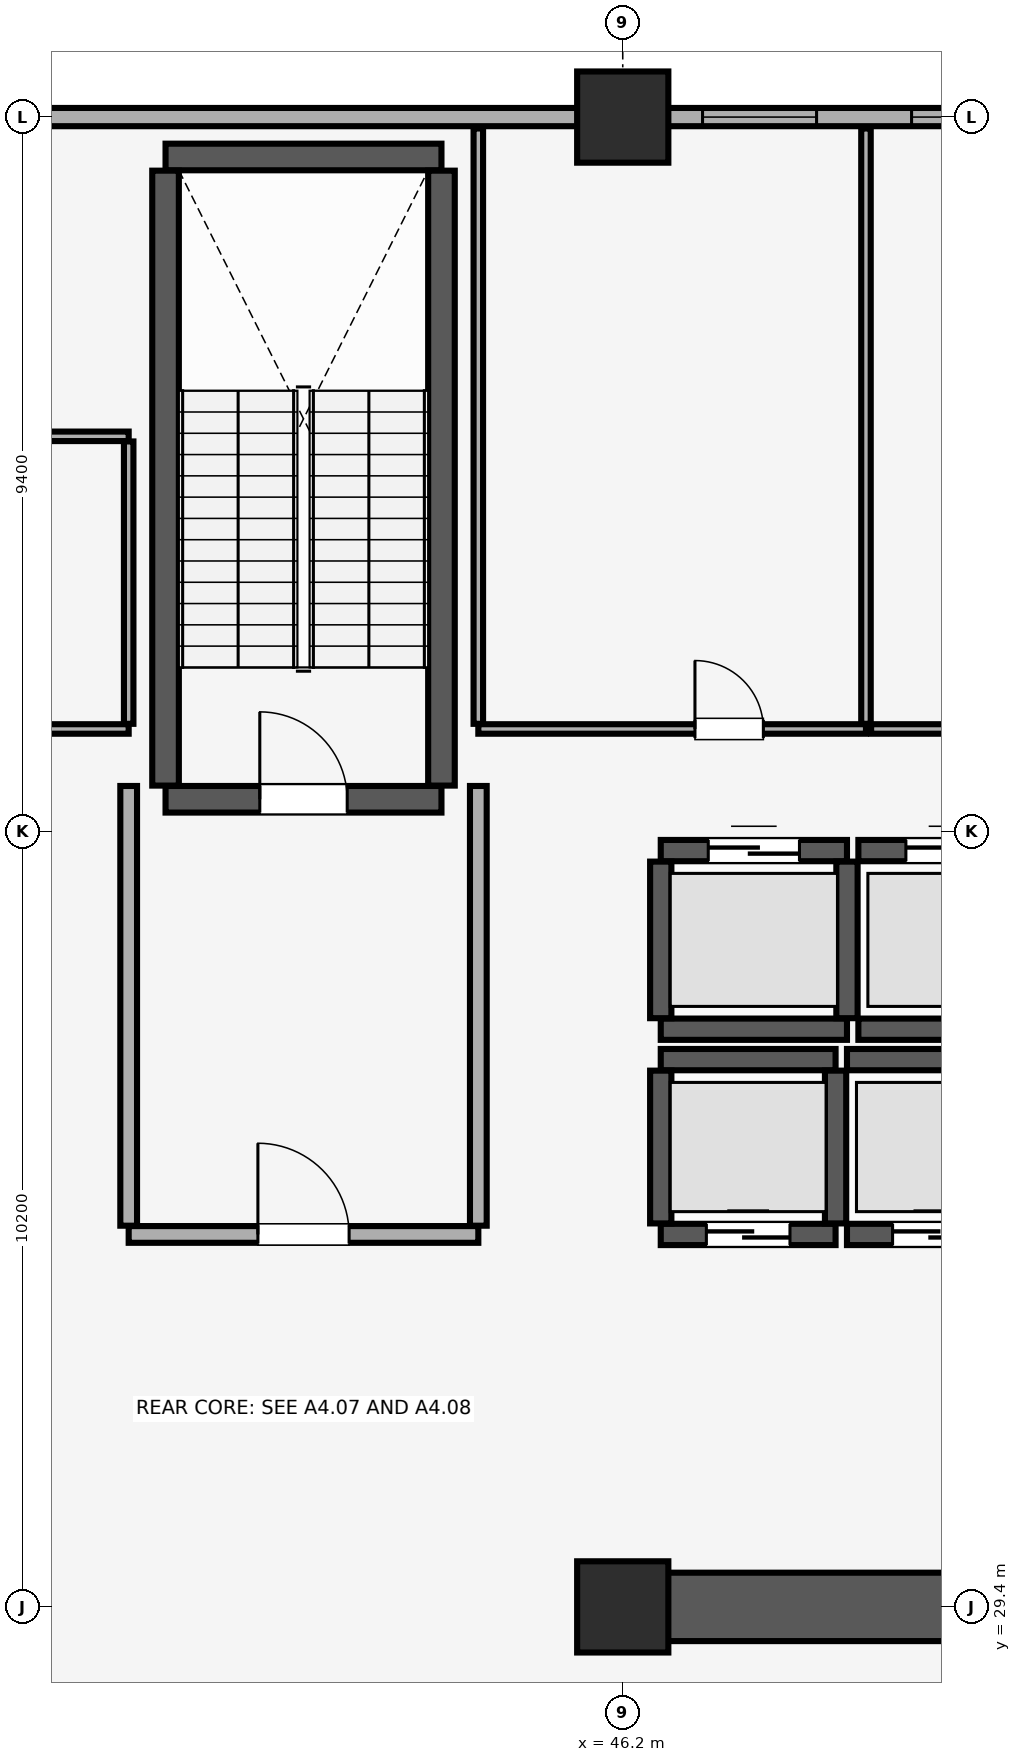
"""IFC4 building model, lengths in metres.
Left out: names, types, materials, properties, quantities, classifications, styles, units other than length and angle.
Written with IfcOpenShell. Run it as: python <this file> out.ifc"""

import sys

from ifc_helpers import new_model, si_unit, direction, frame, frame_2d, origin, origin_2d, place, context, subcontext, project, spatial, rectangle, extrude, element, fill, save


model = new_model("IFC4")
c1 = context("Model", 3, precision=1e-05, world=origin(), true_north=direction((0.0, 1.0)))
c2 = subcontext(c1, "Body", "Model", "MODEL_VIEW")
j1 = project(units=[si_unit("LENGTHUNIT", "METRE"), si_unit("PLANEANGLEUNIT", "RADIAN")], contexts=[c1])
p1 = place(None, origin())
s1 = spatial("IfcSite", under=j1, at=p1, CompositionType="ELEMENT")
p2 = place(p1, origin())
s2 = spatial("IfcBuilding", under=s1, at=p2, CompositionType="ELEMENT")
p3 = place(p2, frame((0.0, 0.0, 224.35)))
s3 = spatial("IfcBuildingStorey", under=s2, at=p3, CompositionType="ELEMENT", Elevation=224.35)
for number, where, z_axis, x_axis in (
    (1, (46.2, 29.4, 0.0), (0.0, 0.0, 1.0), (1.0, 0.0, 0.0)),
    (2, (46.2, 49.0, 0.0), (0.0, 0.0, 1.0), (1.0, 0.0, 0.0)),
):
    element("IfcColumn", number, at=place(p3, frame(where, z_axis=z_axis, x_axis=x_axis)), inside=s3, PredefinedType="COLUMN", context=c2, shape_type="SweptSolid", body=[
        extrude(rectangle(XDim=1.2, YDim=1.2, at=origin_2d()), origin(), (0.0, 0.0, 1.0), 4.56),
    ])
p4 = place(p3, frame((77.0, 49.0, 0.0), z_axis=(0.0, 0.0, 1.0), x_axis=(-1.0, 0.0, 0.0)))
e3 = element("IfcWall", 3, at=p4, inside=s3, PredefinedType="SOLIDWALL", context=c2, shape_type="SweptSolid", body=[
    extrude(rectangle(XDim=70.0, YDim=0.24, at=frame_2d((35.0, 0.0))), origin(), (0.0, 0.0, 1.0), 3.4),
])
p5 = place(p4, frame((62.975, 0.0, 0.85)))
e4 = element("IfcOpeningElement", 4, at=p5, cuts=e3, PredefinedType="OPENING", context=c2, shape_type="SweptSolid", body=[
    extrude(rectangle(XDim=3.0, YDim=1.5, at=frame_2d((1.5, 0.75))), frame((0.0, 0.13, 0.0), z_axis=(0.0, -1.0, 0.0), x_axis=(1.0, 0.0, 0.0)), (0.0, 0.0, 1.0), 0.26),
])
p6 = place(p4, frame((4.025, 0.0, 0.85)))
e5 = element("IfcOpeningElement", 5, at=p6, cuts=e3, PredefinedType="OPENING", context=c2, shape_type="SweptSolid", body=[
    extrude(rectangle(XDim=3.0, YDim=1.5, at=frame_2d((1.5, 0.75))), frame((0.0, 0.13, 0.0), z_axis=(0.0, -1.0, 0.0), x_axis=(1.0, 0.0, 0.0)), (0.0, 0.0, 1.0), 0.26),
])
p7 = place(p4, frame((49.465, 0.0, 0.9)))
e6 = element("IfcOpeningElement", 6, at=p7, cuts=e3, PredefinedType="OPENING", context=c2, shape_type="SweptSolid", body=[
    extrude(rectangle(XDim=1.5, YDim=1.4, at=frame_2d((0.75, 0.7))), frame((0.0, 0.13, 0.0), z_axis=(0.0, -1.0, 0.0), x_axis=(1.0, 0.0, 0.0)), (0.0, 0.0, 1.0), 0.26),
])
p8 = place(p4, frame((41.65, 0.0, 0.9)))
e7 = element("IfcOpeningElement", 7, at=p8, cuts=e3, PredefinedType="OPENING", context=c2, shape_type="SweptSolid", body=[
    extrude(rectangle(XDim=3.6, YDim=1.5, at=frame_2d((1.8, 0.75))), frame((0.0, 0.13, 0.0), z_axis=(0.0, -1.0, 0.0), x_axis=(1.0, 0.0, 0.0)), (0.0, 0.0, 1.0), 0.26),
])
p9 = place(p4, frame((28.25, 0.0, 0.9)))
e8 = element("IfcOpeningElement", 8, at=p9, cuts=e3, PredefinedType="OPENING", context=c2, shape_type="SweptSolid", body=[
    extrude(rectangle(XDim=1.5, YDim=1.4, at=frame_2d((0.75, 0.7))), frame((0.0, 0.13, 0.0), z_axis=(0.0, -1.0, 0.0), x_axis=(1.0, 0.0, 0.0)), (0.0, 0.0, 1.0), 0.26),
])
p10 = place(p4, frame((24.6, 0.0, 0.9)))
e9 = element("IfcOpeningElement", 9, at=p10, cuts=e3, PredefinedType="OPENING", context=c2, shape_type="SweptSolid", body=[
    extrude(rectangle(XDim=2.4, YDim=1.5, at=frame_2d((1.2, 0.75))), frame((0.0, 0.13, 0.0), z_axis=(0.0, -1.0, 0.0), x_axis=(1.0, 0.0, 0.0)), (0.0, 0.0, 1.0), 0.26),
])
p11 = place(p4, frame((20.235, 0.0, 0.9)))
e10 = element("IfcOpeningElement", 10, at=p11, cuts=e3, PredefinedType="OPENING", context=c2, shape_type="SweptSolid", body=[
    extrude(rectangle(XDim=2.4, YDim=1.5, at=frame_2d((1.2, 0.75))), frame((0.0, 0.13, 0.0), z_axis=(0.0, -1.0, 0.0), x_axis=(1.0, 0.0, 0.0)), (0.0, 0.0, 1.0), 0.26),
])
p12 = place(p3, frame((46.0, 29.4, 0.0), z_axis=(0.0, 0.0, 1.0), x_axis=(1.0, 0.0, 0.0)))
e11 = element("IfcWall", 11, at=p12, inside=s3, PredefinedType="SHEAR", context=c2, shape_type="SweptSolid", body=[
    extrude(rectangle(XDim=7.6, YDim=0.9, at=frame_2d((3.8, 0.0))), origin(), (0.0, 0.0, 1.0), 4.52),
])
p13 = place(p3, frame((40.185, 40.025, 0.0), z_axis=(0.0, 0.0, 1.0), x_axis=(1.0, 0.0, 0.0)))
e12 = element("IfcWall", 12, at=p13, inside=s3, PredefinedType="SHEAR", context=c2, shape_type="SweptSolid", body=[
    extrude(rectangle(XDim=3.63, YDim=0.35, at=frame_2d((1.815, 0.0))), origin(), (0.0, 0.0, 1.0), 4.52),
])
p14 = place(p13, frame((1.24, 0.0, 0.0)))
e13 = element("IfcOpeningElement", 13, at=p14, cuts=e12, PredefinedType="OPENING", context=c2, shape_type="SweptSolid", body=[
    extrude(rectangle(XDim=1.15, YDim=2.15, at=frame_2d((0.575, 1.075))), frame((0.0, 0.185, 0.0), z_axis=(0.0, -1.0, 0.0), x_axis=(1.0, 0.0, 0.0)), (0.0, 0.0, 1.0), 0.37),
])
p15 = place(p3, frame((40.185, 48.475, 0.0), z_axis=(0.0, 0.0, 1.0), x_axis=(1.0, 0.0, 0.0)))
e14 = element("IfcWall", 14, at=p15, inside=s3, PredefinedType="SHEAR", context=c2, shape_type="SweptSolid", body=[
    extrude(rectangle(XDim=3.63, YDim=0.35, at=frame_2d((1.815, 0.0))), origin(), (0.0, 0.0, 1.0), 4.52),
])
for number, where, z_axis, x_axis in (
    (15, (40.185, 40.205, 0.0), (0.0, 0.0, 1.0), (0.0, 1.0, 0.0)),
    (16, (43.815, 40.205, 0.0), (0.0, 0.0, 1.0), (0.0, 1.0, 0.0)),
):
    element("IfcWall", number, at=place(p3, frame(where, z_axis=z_axis, x_axis=x_axis)), inside=s3, PredefinedType="SHEAR", context=c2, shape_type="SweptSolid", body=[
        extrude(rectangle(XDim=8.09, YDim=0.35, at=frame_2d((4.045, 0.0))), origin(), (0.0, 0.0, 1.0), 4.52),
    ])
p16 = place(p3, frame((46.7, 34.3, 0.0), z_axis=(0.0, 0.0, 1.0), x_axis=(1.0, 0.0, 0.0)))
e17 = element("IfcWall", 17, at=p16, inside=s3, PredefinedType="SHEAR", context=c2, shape_type="SweptSolid", body=[
    extrude(rectangle(XDim=2.3, YDim=0.28, at=frame_2d((1.15, 0.0))), origin(), (0.0, 0.0, 1.0), 4.52),
])
p17 = place(p16, frame((0.6, 0.0, 0.0)))
e18 = element("IfcOpeningElement", 18, at=p17, cuts=e17, PredefinedType="OPENING", context=c2, shape_type="SweptSolid", body=[
    extrude(rectangle(XDim=1.1, YDim=2.2, at=frame_2d((0.55, 1.1))), frame((0.0, 0.15, 0.0), z_axis=(0.0, -1.0, 0.0), x_axis=(1.0, 0.0, 0.0)), (0.0, 0.0, 1.0), 0.3),
])
p18 = place(p3, frame((46.7, 36.6, 0.0), z_axis=(0.0, 0.0, 1.0), x_axis=(1.0, 0.0, 0.0)))
e19 = element("IfcWall", 19, at=p18, inside=s3, PredefinedType="SHEAR", context=c2, shape_type="SweptSolid", body=[
    extrude(rectangle(XDim=2.3, YDim=0.28, at=frame_2d((1.15, 0.0))), origin(), (0.0, 0.0, 1.0), 4.52),
])
for number, where, z_axis, x_axis in (
    (20, (46.7, 34.445, 0.0), (0.0, 0.0, 1.0), (0.0, 1.0, 0.0)),
    (21, (49.0, 34.445, 0.0), (0.0, 0.0, 1.0), (0.0, 1.0, 0.0)),
):
    element("IfcWall", number, at=place(p3, frame(where, z_axis=z_axis, x_axis=x_axis)), inside=s3, PredefinedType="SHEAR", context=c2, shape_type="SweptSolid", body=[
        extrude(rectangle(XDim=2.01, YDim=0.28, at=frame_2d((1.005, 0.0))), origin(), (0.0, 0.0, 1.0), 4.52),
    ])
p19 = place(p3, frame((49.15, 34.3, 0.0), z_axis=(0.0, 0.0, 1.0), x_axis=(1.0, 0.0, 0.0)))
e22 = element("IfcWall", 22, at=p19, inside=s3, PredefinedType="SHEAR", context=c2, shape_type="SweptSolid", body=[
    extrude(rectangle(XDim=2.3, YDim=0.28, at=frame_2d((1.15, 0.0))), origin(), (0.0, 0.0, 1.0), 4.52),
])
p20 = place(p19, frame((0.6, 0.0, 0.0)))
e23 = element("IfcOpeningElement", 23, at=p20, cuts=e22, PredefinedType="OPENING", context=c2, shape_type="SweptSolid", body=[
    extrude(rectangle(XDim=1.1, YDim=2.2, at=frame_2d((0.55, 1.1))), frame((0.0, 0.15, 0.0), z_axis=(0.0, -1.0, 0.0), x_axis=(1.0, 0.0, 0.0)), (0.0, 0.0, 1.0), 0.3),
])
p21 = place(p3, frame((49.15, 36.6, 0.0), z_axis=(0.0, 0.0, 1.0), x_axis=(1.0, 0.0, 0.0)))
e24 = element("IfcWall", 24, at=p21, inside=s3, PredefinedType="SHEAR", context=c2, shape_type="SweptSolid", body=[
    extrude(rectangle(XDim=2.3, YDim=0.28, at=frame_2d((1.15, 0.0))), origin(), (0.0, 0.0, 1.0), 4.52),
])
p22 = place(p3, frame((46.7, 37.0, 0.0), z_axis=(0.0, 0.0, 1.0), x_axis=(1.0, 0.0, 0.0)))
e25 = element("IfcWall", 25, at=p22, inside=s3, PredefinedType="SHEAR", context=c2, shape_type="SweptSolid", body=[
    extrude(rectangle(XDim=2.45, YDim=0.28, at=frame_2d((1.225, 0.0))), origin(), (0.0, 0.0, 1.0), 4.52),
])
p23 = place(p3, frame((46.7, 39.35, 0.0), z_axis=(0.0, 0.0, 1.0), x_axis=(1.0, 0.0, 0.0)))
e26 = element("IfcWall", 26, at=p23, inside=s3, PredefinedType="SHEAR", context=c2, shape_type="SweptSolid", body=[
    extrude(rectangle(XDim=2.45, YDim=0.28, at=frame_2d((1.225, 0.0))), origin(), (0.0, 0.0, 1.0), 4.52),
])
p24 = place(p23, frame((0.625, 0.0, 0.0)))
e27 = element("IfcOpeningElement", 27, at=p24, cuts=e26, PredefinedType="OPENING", context=c2, shape_type="SweptSolid", body=[
    extrude(rectangle(XDim=1.2, YDim=2.25, at=frame_2d((0.6, 1.125))), frame((0.0, 0.15, 0.0), z_axis=(0.0, -1.0, 0.0), x_axis=(1.0, 0.0, 0.0)), (0.0, 0.0, 1.0), 0.3),
])
for number, where, z_axis, x_axis in (
    (28, (46.7, 37.145, 0.0), (0.0, 0.0, 1.0), (0.0, 1.0, 0.0)),
    (29, (49.15, 37.145, 0.0), (0.0, 0.0, 1.0), (0.0, 1.0, 0.0)),
):
    element("IfcWall", number, at=place(p3, frame(where, z_axis=z_axis, x_axis=x_axis)), inside=s3, PredefinedType="SHEAR", context=c2, shape_type="SweptSolid", body=[
        extrude(rectangle(XDim=2.06, YDim=0.28, at=frame_2d((1.03, 0.0))), origin(), (0.0, 0.0, 1.0), 4.52),
    ])
p25 = place(p3, frame((49.3, 37.0, 0.0), z_axis=(0.0, 0.0, 1.0), x_axis=(1.0, 0.0, 0.0)))
e30 = element("IfcWall", 30, at=p25, inside=s3, PredefinedType="SHEAR", context=c2, shape_type="SweptSolid", body=[
    extrude(rectangle(XDim=2.45, YDim=0.28, at=frame_2d((1.225, 0.0))), origin(), (0.0, 0.0, 1.0), 4.52),
])
p26 = place(p3, frame((49.3, 39.35, 0.0), z_axis=(0.0, 0.0, 1.0), x_axis=(1.0, 0.0, 0.0)))
e31 = element("IfcWall", 31, at=p26, inside=s3, PredefinedType="SHEAR", context=c2, shape_type="SweptSolid", body=[
    extrude(rectangle(XDim=2.45, YDim=0.28, at=frame_2d((1.225, 0.0))), origin(), (0.0, 0.0, 1.0), 4.52),
])
p27 = place(p26, frame((0.625, 0.0, 0.0)))
e32 = element("IfcOpeningElement", 32, at=p27, cuts=e31, PredefinedType="OPENING", context=c2, shape_type="SweptSolid", body=[
    extrude(rectangle(XDim=1.2, YDim=2.25, at=frame_2d((0.6, 1.125))), frame((0.0, 0.15, 0.0), z_axis=(0.0, -1.0, 0.0), x_axis=(1.0, 0.0, 0.0)), (0.0, 0.0, 1.0), 0.3),
])
p28 = place(p3, frame((39.7, 34.3, 0.0), z_axis=(0.0, 0.0, 1.0), x_axis=(1.0, 0.0, 0.0)))
e33 = element("IfcWall", 33, at=p28, inside=s3, PredefinedType="PARTITIONING", context=c2, shape_type="SweptSolid", body=[
    extrude(rectangle(XDim=4.6, YDim=0.22, at=frame_2d((2.3, 0.0))), origin(), (0.0, 0.0, 1.0), 4.52),
])
p29 = place(p28, frame((1.7, 0.0, 0.0)))
e34 = element("IfcOpeningElement", 34, at=p29, cuts=e33, PredefinedType="OPENING", context=c2, shape_type="SweptSolid", body=[
    extrude(rectangle(XDim=1.2, YDim=2.15, at=frame_2d((0.6, 1.075))), frame((0.0, 0.12, 0.0), z_axis=(0.0, -1.0, 0.0), x_axis=(1.0, 0.0, 0.0)), (0.0, 0.0, 1.0), 0.24),
])
for number, where, z_axis, x_axis in (
    (35, (39.7, 34.415, 0.0), (0.0, 0.0, 1.0), (0.0, 1.0, 0.0)),
    (36, (44.3, 34.415, 0.0), (0.0, 0.0, 1.0), (0.0, 1.0, 0.0)),
):
    element("IfcWall", number, at=place(p3, frame(where, z_axis=z_axis, x_axis=x_axis)), inside=s3, PredefinedType="PARTITIONING", context=c2, shape_type="SweptSolid", body=[
        extrude(rectangle(XDim=5.785, YDim=0.22, at=frame_2d((2.893, 0.0))), origin(), (0.0, 0.0, 1.0), 4.52),
    ])
p30 = place(p3, frame((36.11, 40.95, 0.0), z_axis=(0.0, 0.0, 1.0), x_axis=(1.0, 0.0, 0.0)))
e37 = element("IfcWall", 37, at=p30, inside=s3, PredefinedType="PARTITIONING", context=c2, shape_type="SweptSolid", body=[
    extrude(rectangle(XDim=3.59, YDim=0.125, at=frame_2d((1.795, 0.0))), origin(), (0.0, 0.0, 1.0), 4.52),
])
p31 = place(p30, frame((1.34, 0.0, 0.0)))
e38 = element("IfcOpeningElement", 38, at=p31, cuts=e37, PredefinedType="OPENING", context=c2, shape_type="SweptSolid", body=[
    extrude(rectangle(XDim=0.9, YDim=2.1, at=frame_2d((0.45, 1.05))), frame((0.0, 0.073, 0.0), z_axis=(0.0, -1.0, 0.0), x_axis=(1.0, 0.0, 0.0)), (0.0, 0.0, 1.0), 0.145),
])
p32 = place(p3, frame((36.18, 44.8, 0.0), z_axis=(0.0, 0.0, 1.0), x_axis=(1.0, 0.0, 0.0)))
e39 = element("IfcWall", 39, at=p32, inside=s3, PredefinedType="PARTITIONING", context=c2, shape_type="SweptSolid", body=[
    extrude(rectangle(XDim=3.52, YDim=0.125, at=frame_2d((1.76, 0.0))), origin(), (0.0, 0.0, 1.0), 4.52),
])
p33 = place(p3, frame((39.7, 41.018, 0.0), z_axis=(0.0, 0.0, 1.0), x_axis=(0.0, 1.0, 0.0)))
e40 = element("IfcWall", 40, at=p33, inside=s3, PredefinedType="PARTITIONING", context=c2, shape_type="SweptSolid", body=[
    extrude(rectangle(XDim=3.715, YDim=0.125, at=frame_2d((1.857, 0.0))), origin(), (0.0, 0.0, 1.0), 4.52),
])
p34 = place(p3, frame((44.3, 40.95, 0.0), z_axis=(0.0, 0.0, 1.0), x_axis=(1.0, 0.0, 0.0)))
e41 = element("IfcWall", 41, at=p34, inside=s3, PredefinedType="PARTITIONING", context=c2, shape_type="SweptSolid", body=[
    extrude(rectangle(XDim=5.1, YDim=0.125, at=frame_2d((2.55, 0.0))), origin(), (0.0, 0.0, 1.0), 4.52),
])
p35 = place(p34, frame((2.85, 0.0, 0.0)))
e42 = element("IfcOpeningElement", 42, at=p35, cuts=e41, PredefinedType="OPENING", context=c2, shape_type="SweptSolid", body=[
    extrude(rectangle(XDim=0.9, YDim=2.1, at=frame_2d((0.45, 1.05))), frame((0.0, 0.073, 0.0), z_axis=(0.0, -1.0, 0.0), x_axis=(1.0, 0.0, 0.0)), (0.0, 0.0, 1.0), 0.145),
])
for number, where, z_axis, x_axis in (
    (43, (44.3, 41.018, 0.0), (0.0, 0.0, 1.0), (0.0, 1.0, 0.0)),
    (44, (49.4, 41.018, 0.0), (0.0, 0.0, 1.0), (0.0, 1.0, 0.0)),
):
    element("IfcWall", number, at=place(p3, frame(where, z_axis=z_axis, x_axis=x_axis)), inside=s3, PredefinedType="PARTITIONING", context=c2, shape_type="SweptSolid", body=[
        extrude(rectangle(XDim=7.833, YDim=0.125, at=frame_2d((3.916, 0.0))), origin(), (0.0, 0.0, 1.0), 4.52),
    ])
p36 = place(p3, frame((49.468, 40.95, 0.0), z_axis=(0.0, 0.0, 1.0), x_axis=(1.0, 0.0, 0.0)))
e45 = element("IfcWall", 45, at=p36, inside=s3, PredefinedType="PARTITIONING", context=c2, shape_type="SweptSolid", body=[
    extrude(rectangle(XDim=8.032, YDim=0.125, at=frame_2d((4.016, 0.0))), origin(), (0.0, 0.0, 1.0), 4.52),
])
p37 = place(p36, frame((4.782, 0.0, 0.0)))
e46 = element("IfcOpeningElement", 46, at=p37, cuts=e45, PredefinedType="OPENING", context=c2, shape_type="SweptSolid", body=[
    extrude(rectangle(XDim=0.9, YDim=2.1, at=frame_2d((0.45, 1.05))), frame((0.0, 0.073, 0.0), z_axis=(0.0, -1.0, 0.0), x_axis=(1.0, 0.0, 0.0)), (0.0, 0.0, 1.0), 0.145),
])
p38 = place(p9, origin())
e47 = element("IfcWindow", 47, at=p38, inside=s3, PartitioningType="SINGLE_PANEL", PredefinedType="WINDOW", context=c2, shape_type="SweptSolid", body=[
    extrude(rectangle(XDim=1.5, YDim=1.4, at=frame_2d((0.75, 0.7))), frame((0.0, 0.03, 0.0), z_axis=(0.0, -1.0, 0.0), x_axis=(1.0, 0.0, 0.0)), (0.0, 0.0, 1.0), 0.06),
])
fill(e8, e47)
p39 = place(p10, origin())
e48 = element("IfcWindow", 48, at=p39, inside=s3, PartitioningType="SINGLE_PANEL", PredefinedType="WINDOW", context=c2, shape_type="SweptSolid", body=[
    extrude(rectangle(XDim=2.4, YDim=1.5, at=frame_2d((1.2, 0.75))), frame((0.0, 0.03, 0.0), z_axis=(0.0, -1.0, 0.0), x_axis=(1.0, 0.0, 0.0)), (0.0, 0.0, 1.0), 0.06),
])
fill(e9, e48)
p40 = place(p14, origin())
e49 = element("IfcDoor", 49, at=p40, inside=s3, OperationType="SINGLE_SWING_LEFT", PredefinedType="DOOR", context=c2, shape_type="SweptSolid", body=[
    extrude(rectangle(XDim=1.15, YDim=2.15, at=frame_2d((0.575, 1.075))), frame((0.0, 0.025, 0.0), z_axis=(0.0, -1.0, 0.0), x_axis=(1.0, 0.0, 0.0)), (0.0, 0.0, 1.0), 0.05),
])
fill(e13, e49)
p41 = place(p17, origin())
e50 = element("IfcDoor", 50, at=p41, inside=s3, OperationType="DOUBLE_DOOR_SLIDING", PredefinedType="DOOR", context=c2, shape_type="SweptSolid", body=[
    extrude(rectangle(XDim=1.1, YDim=2.2, at=frame_2d((0.55, 1.1))), frame((0.0, 0.025, 0.0), z_axis=(0.0, -1.0, 0.0), x_axis=(1.0, 0.0, 0.0)), (0.0, 0.0, 1.0), 0.05),
])
fill(e18, e50)
p42 = place(p20, origin())
e51 = element("IfcDoor", 51, at=p42, inside=s3, OperationType="DOUBLE_DOOR_SLIDING", PredefinedType="DOOR", context=c2, shape_type="SweptSolid", body=[
    extrude(rectangle(XDim=1.1, YDim=2.2, at=frame_2d((0.55, 1.1))), frame((0.0, 0.025, 0.0), z_axis=(0.0, -1.0, 0.0), x_axis=(1.0, 0.0, 0.0)), (0.0, 0.0, 1.0), 0.05),
])
fill(e23, e51)
p43 = place(p24, origin())
e52 = element("IfcDoor", 52, at=p43, inside=s3, OperationType="DOUBLE_DOOR_SLIDING", PredefinedType="DOOR", context=c2, shape_type="SweptSolid", body=[
    extrude(rectangle(XDim=1.2, YDim=2.25, at=frame_2d((0.6, 1.125))), frame((0.0, 0.025, 0.0), z_axis=(0.0, -1.0, 0.0), x_axis=(1.0, 0.0, 0.0)), (0.0, 0.0, 1.0), 0.05),
])
fill(e27, e52)
p44 = place(p27, origin())
e53 = element("IfcDoor", 53, at=p44, inside=s3, OperationType="DOUBLE_DOOR_SLIDING", PredefinedType="DOOR", context=c2, shape_type="SweptSolid", body=[
    extrude(rectangle(XDim=1.2, YDim=2.25, at=frame_2d((0.6, 1.125))), frame((0.0, 0.025, 0.0), z_axis=(0.0, -1.0, 0.0), x_axis=(1.0, 0.0, 0.0)), (0.0, 0.0, 1.0), 0.05),
])
fill(e32, e53)
p45 = place(p29, origin())
e54 = element("IfcDoor", 54, at=p45, inside=s3, OperationType="SINGLE_SWING_LEFT", PredefinedType="DOOR", context=c2, shape_type="SweptSolid", body=[
    extrude(rectangle(XDim=1.2, YDim=2.15, at=frame_2d((0.6, 1.075))), frame((0.0, 0.025, 0.0), z_axis=(0.0, -1.0, 0.0), x_axis=(1.0, 0.0, 0.0)), (0.0, 0.0, 1.0), 0.05),
])
fill(e34, e54)
p46 = place(p35, origin())
e55 = element("IfcDoor", 55, at=p46, inside=s3, OperationType="SINGLE_SWING_LEFT", PredefinedType="DOOR", context=c2, shape_type="SweptSolid", body=[
    extrude(rectangle(XDim=0.9, YDim=2.1, at=frame_2d((0.45, 1.05))), frame((0.0, 0.025, 0.0), z_axis=(0.0, -1.0, 0.0), x_axis=(1.0, 0.0, 0.0)), (0.0, 0.0, 1.0), 0.05),
])
fill(e42, e55)
save(model, sys.argv[1])
